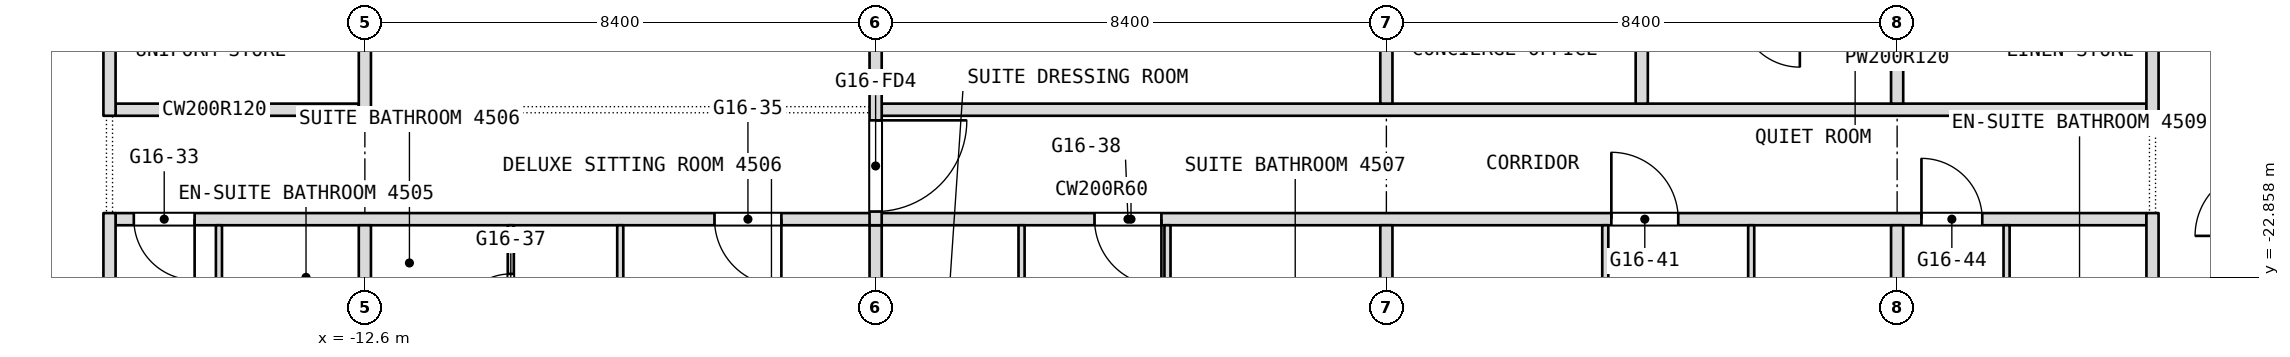
"""IFC4 building model, lengths in metres.
Left out: names, types, materials, properties, quantities, classifications, styles, units other than length and angle.
Written with IfcOpenShell. Run it as: python <this file> out.ifc"""

import sys

from ifc_helpers import new_model, si_unit, direction, frame, frame_2d, origin, place, context, subcontext, project, spatial, rectangle, extrude, element, fill, save


model = new_model("IFC4")
c1 = context("Model", 3, precision=1e-05, world=origin(), true_north=direction((0.0, 1.0)))
c2 = subcontext(c1, "Body", "Model", "MODEL_VIEW")
j1 = project(units=[si_unit("LENGTHUNIT", "METRE"), si_unit("PLANEANGLEUNIT", "RADIAN")], contexts=[c1])
p1 = place(None, origin())
s1 = spatial("IfcSite", under=j1, at=p1, CompositionType="ELEMENT")
p2 = place(p1, origin())
s2 = spatial("IfcBuilding", under=s1, at=p2, CompositionType="ELEMENT")
p3 = place(p2, frame((0.0, 0.0, 198.5)))
s3 = spatial("IfcBuildingStorey", under=s2, at=p3, CompositionType="ELEMENT", Elevation=198.5)
p4 = place(p3, frame((-16.7, -21.9, 0.0), z_axis=(0.0, 0.0, 1.0), x_axis=(1.0, 0.0, 0.0)))
e1 = element("IfcWall", 1, at=p4, inside=s3, PredefinedType="PARTITIONING", context=c2, shape_type="SweptSolid", body=[
    extrude(rectangle(XDim=33.4, YDim=0.2, at=frame_2d((16.7, 0.0))), origin(), (0.0, 0.0, 1.0), 3.34),
])
p5 = place(p4, frame((0.3, 0.0, 0.0)))
e2 = element("IfcOpeningElement", 2, at=p5, cuts=e1, PredefinedType="OPENING", context=c2, shape_type="SweptSolid", body=[
    extrude(rectangle(XDim=1.0, YDim=2.1, at=frame_2d((0.5, 1.05))), frame((0.0, 0.1, 0.0), z_axis=(0.0, -1.0, 0.0), x_axis=(1.0, 0.0, 0.0)), (0.0, 0.0, 1.0), 0.2),
])
p6 = place(p4, frame((9.85, 0.0, 0.0)))
e3 = element("IfcOpeningElement", 3, at=p6, cuts=e1, PredefinedType="OPENING", context=c2, shape_type="SweptSolid", body=[
    extrude(rectangle(XDim=1.1, YDim=2.1, at=frame_2d((0.55, 1.05))), frame((0.0, 0.1, 0.0), z_axis=(0.0, -1.0, 0.0), x_axis=(1.0, 0.0, 0.0)), (0.0, 0.0, 1.0), 0.2),
])
p7 = place(p4, frame((16.1, 0.0, 0.0)))
e4 = element("IfcOpeningElement", 4, at=p7, cuts=e1, PredefinedType="OPENING", context=c2, shape_type="SweptSolid", body=[
    extrude(rectangle(XDim=1.1, YDim=2.1, at=frame_2d((0.55, 1.05))), frame((0.0, 0.1, 0.0), z_axis=(0.0, -1.0, 0.0), x_axis=(1.0, 0.0, 0.0)), (0.0, 0.0, 1.0), 0.2),
])
p8 = place(p4, frame((24.6, 0.0, 0.0)))
e5 = element("IfcOpeningElement", 5, at=p8, cuts=e1, PredefinedType="OPENING", context=c2, shape_type="SweptSolid", body=[
    extrude(rectangle(XDim=1.1, YDim=2.1, at=frame_2d((0.55, 1.05))), frame((0.0, 0.1, 0.0), z_axis=(0.0, -1.0, 0.0), x_axis=(1.0, 0.0, 0.0)), (0.0, 0.0, 1.0), 0.2),
])
p9 = place(p4, frame((29.7, 0.0, 0.0)))
e6 = element("IfcOpeningElement", 6, at=p9, cuts=e1, PredefinedType="OPENING", context=c2, shape_type="SweptSolid", body=[
    extrude(rectangle(XDim=1.0, YDim=2.1, at=frame_2d((0.5, 1.05))), frame((0.0, 0.1, 0.0), z_axis=(0.0, -1.0, 0.0), x_axis=(1.0, 0.0, 0.0)), (0.0, 0.0, 1.0), 0.2),
])
p10 = place(p3, frame((-16.7, -20.1, 0.0), z_axis=(0.0, 0.0, 1.0), x_axis=(1.0, 0.0, 0.0)))
e7 = element("IfcWall", 7, at=p10, inside=s3, PredefinedType="PARTITIONING", context=c2, shape_type="SweptSolid", body=[
    extrude(rectangle(XDim=4.0, YDim=0.2, at=frame_2d((2.0, 0.0))), origin(), (0.0, 0.0, 1.0), 3.34),
])
p11 = place(p3, frame((-4.1, -20.1, 0.0), z_axis=(0.0, 0.0, 1.0), x_axis=(1.0, 0.0, 0.0)))
e8 = element("IfcWall", 8, at=p11, inside=s3, PredefinedType="PARTITIONING", context=c2, shape_type="SweptSolid", body=[
    extrude(rectangle(XDim=20.8, YDim=0.2, at=frame_2d((10.4, 0.0))), origin(), (0.0, 0.0, 1.0), 3.34),
])
p12 = place(p3, frame((16.8, -27.229, 0.0), z_axis=(0.0, 0.0, 1.0), x_axis=(0.0, 1.0, 0.0)))
e9 = element("IfcWall", 9, at=p12, inside=s3, PredefinedType="PARTITIONING", context=c2, shape_type="SweptSolid", body=[
    extrude(rectangle(XDim=5.429, YDim=0.2, at=frame_2d((2.714, 0.0))), origin(), (0.0, 0.0, 1.0), 3.34),
])
p13 = place(p3, frame((16.8, -20.2, 0.0), z_axis=(0.0, 0.0, 1.0), x_axis=(0.0, 1.0, 0.0)))
e10 = element("IfcWall", 10, at=p13, inside=s3, PredefinedType="PARTITIONING", context=c2, shape_type="SweptSolid", body=[
    extrude(rectangle(XDim=6.8, YDim=0.2, at=frame_2d((3.4, 0.0))), origin(), (0.0, 0.0, 1.0), 3.34),
])
p14 = place(p3, frame((14.4, -25.85, 0.0), z_axis=(0.0, 0.0, 1.0), x_axis=(0.0, 1.0, 0.0)))
e11 = element("IfcWall", 11, at=p14, inside=s3, PredefinedType="PARTITIONING", context=c2, shape_type="SweptSolid", body=[
    extrude(rectangle(XDim=3.85, YDim=0.1, at=frame_2d((1.925, 0.0))), origin(), (0.0, 0.0, 1.0), 3.34),
])
p15 = place(p3, frame((12.6, -28.343, 0.0), z_axis=(0.0, 0.0, 1.0), x_axis=(0.0, 1.0, 0.0)))
e12 = element("IfcWall", 12, at=p15, inside=s3, PredefinedType="PARTITIONING", context=c2, shape_type="SweptSolid", body=[
    extrude(rectangle(XDim=6.343, YDim=0.2, at=frame_2d((3.171, 0.0))), origin(), (0.0, 0.0, 1.0), 3.34),
])
p16 = place(p3, frame((12.6, -20.0, 0.0), z_axis=(0.0, 0.0, 1.0), x_axis=(0.0, 1.0, 0.0)))
e13 = element("IfcWall", 13, at=p16, inside=s3, PredefinedType="PARTITIONING", context=c2, shape_type="SweptSolid", body=[
    extrude(rectangle(XDim=1.5, YDim=0.2, at=frame_2d((0.75, 0.0))), origin(), (0.0, 0.0, 1.0), 3.34),
])
p17 = place(p3, frame((10.2, -25.55, 0.0), z_axis=(0.0, 0.0, 1.0), x_axis=(0.0, 1.0, 0.0)))
e14 = element("IfcWall", 14, at=p17, inside=s3, PredefinedType="PARTITIONING", context=c2, shape_type="SweptSolid", body=[
    extrude(rectangle(XDim=3.55, YDim=0.1, at=frame_2d((1.775, 0.0))), origin(), (0.0, 0.0, 1.0), 3.34),
])
p18 = place(p3, frame((8.4, -20.0, 0.0), z_axis=(0.0, 0.0, 1.0), x_axis=(0.0, 1.0, 0.0)))
e15 = element("IfcWall", 15, at=p18, inside=s3, PredefinedType="PARTITIONING", context=c2, shape_type="SweptSolid", body=[
    extrude(rectangle(XDim=1.5, YDim=0.2, at=frame_2d((0.75, 0.0))), origin(), (0.0, 0.0, 1.0), 3.34),
])
p19 = place(p3, frame((7.8, -25.45, 0.0), z_axis=(0.0, 0.0, 1.0), x_axis=(0.0, 1.0, 0.0)))
e16 = element("IfcWall", 16, at=p19, inside=s3, PredefinedType="PARTITIONING", context=c2, shape_type="SweptSolid", body=[
    extrude(rectangle(XDim=3.45, YDim=0.1, at=frame_2d((1.725, 0.0))), origin(), (0.0, 0.0, 1.0), 3.34),
])
p20 = place(p3, frame((4.2, -28.9, 0.0), z_axis=(0.0, 0.0, 1.0), x_axis=(0.0, 1.0, 0.0)))
e17 = element("IfcWall", 17, at=p20, inside=s3, PredefinedType="PARTITIONING", context=c2, shape_type="SweptSolid", body=[
    extrude(rectangle(XDim=6.9, YDim=0.2, at=frame_2d((3.45, 0.0))), origin(), (0.0, 0.0, 1.0), 3.34),
])
p21 = place(p3, frame((4.2, -20.0, 0.0), z_axis=(0.0, 0.0, 1.0), x_axis=(0.0, 1.0, 0.0)))
e18 = element("IfcWall", 18, at=p21, inside=s3, PredefinedType="PARTITIONING", context=c2, shape_type="SweptSolid", body=[
    extrude(rectangle(XDim=6.4, YDim=0.2, at=frame_2d((3.2, 0.0))), origin(), (0.0, 0.0, 1.0), 3.34),
])
p22 = place(p3, frame((0.6, -25.55, 0.0), z_axis=(0.0, 0.0, 1.0), x_axis=(0.0, 1.0, 0.0)))
e19 = element("IfcWall", 19, at=p22, inside=s3, PredefinedType="PARTITIONING", context=c2, shape_type="SweptSolid", body=[
    extrude(rectangle(XDim=3.55, YDim=0.1, at=frame_2d((1.775, 0.0))), origin(), (0.0, 0.0, 1.0), 3.34),
])
p23 = place(p3, frame((-1.8, -25.45, 0.0), z_axis=(0.0, 0.0, 1.0), x_axis=(0.0, 1.0, 0.0)))
e20 = element("IfcWall", 20, at=p23, inside=s3, PredefinedType="PARTITIONING", context=c2, shape_type="SweptSolid", body=[
    extrude(rectangle(XDim=3.45, YDim=0.1, at=frame_2d((1.725, 0.0))), origin(), (0.0, 0.0, 1.0), 3.34),
])
p24 = place(p3, frame((-4.2, -28.9, 0.0), z_axis=(0.0, 0.0, 1.0), x_axis=(0.0, 1.0, 0.0)))
e21 = element("IfcWall", 21, at=p24, inside=s3, PredefinedType="PARTITIONING", context=c2, shape_type="SweptSolid", body=[
    extrude(rectangle(XDim=6.9, YDim=0.2, at=frame_2d((3.45, 0.0))), origin(), (0.0, 0.0, 1.0), 3.34),
])
p25 = place(p3, frame((-4.2, -22.0, 0.0), z_axis=(0.0, 0.0, 1.0), x_axis=(0.0, 1.0, 0.0)))
e22 = element("IfcWall", 22, at=p25, inside=s3, PredefinedType="PARTITIONING", context=c2, shape_type="SweptSolid", body=[
    extrude(rectangle(XDim=8.4, YDim=0.2, at=frame_2d((4.2, 0.0))), origin(), (0.0, 0.0, 1.0), 3.34),
])
p26 = place(p25, frame((0.225, 0.0, 0.0)))
e23 = element("IfcOpeningElement", 23, at=p26, cuts=e22, PredefinedType="OPENING", context=c2, shape_type="SweptSolid", body=[
    extrude(rectangle(XDim=1.5, YDim=2.1, at=frame_2d((0.75, 1.05))), frame((0.0, 0.1, 0.0), z_axis=(0.0, -1.0, 0.0), x_axis=(1.0, 0.0, 0.0)), (0.0, 0.0, 1.0), 0.2),
])
p27 = place(p3, frame((-8.4, -28.9, 0.0), z_axis=(0.0, 0.0, 1.0), x_axis=(0.0, 1.0, 0.0)))
e24 = element("IfcWall", 24, at=p27, inside=s3, PredefinedType="PARTITIONING", context=c2, shape_type="SweptSolid", body=[
    extrude(rectangle(XDim=6.9, YDim=0.1, at=frame_2d((3.45, 0.0))), origin(), (0.0, 0.0, 1.0), 3.34),
])
p28 = place(p27, frame((2.53, 0.0, 0.0)))
e25 = element("IfcOpeningElement", 25, at=p28, cuts=e24, PredefinedType="OPENING", context=c2, shape_type="SweptSolid", body=[
    extrude(rectangle(XDim=0.9, YDim=2.1, at=frame_2d((0.45, 1.05))), frame((0.0, 0.05, 0.0), z_axis=(0.0, -1.0, 0.0), x_axis=(1.0, 0.0, 0.0)), (0.0, 0.0, 1.0), 0.1),
])
p29 = place(p3, frame((-10.2, -24.55, 0.0), z_axis=(0.0, 0.0, 1.0), x_axis=(0.0, 1.0, 0.0)))
e26 = element("IfcWall", 26, at=p29, inside=s3, PredefinedType="PARTITIONING", context=c2, shape_type="SweptSolid", body=[
    extrude(rectangle(XDim=2.55, YDim=0.1, at=frame_2d((1.275, 0.0))), origin(), (0.0, 0.0, 1.0), 3.34),
])
p30 = place(p29, frame((0.85, 0.0, 0.0)))
e27 = element("IfcOpeningElement", 27, at=p30, cuts=e26, PredefinedType="OPENING", context=c2, shape_type="SweptSolid", body=[
    extrude(rectangle(XDim=0.9, YDim=2.1, at=frame_2d((0.45, 1.05))), frame((0.0, 0.05, 0.0), z_axis=(0.0, -1.0, 0.0), x_axis=(1.0, 0.0, 0.0)), (0.0, 0.0, 1.0), 0.1),
])
p31 = place(p3, frame((-12.6, -28.343, 0.0), z_axis=(0.0, 0.0, 1.0), x_axis=(0.0, 1.0, 0.0)))
e28 = element("IfcWall", 28, at=p31, inside=s3, PredefinedType="PARTITIONING", context=c2, shape_type="SweptSolid", body=[
    extrude(rectangle(XDim=6.343, YDim=0.2, at=frame_2d((3.171, 0.0))), origin(), (0.0, 0.0, 1.0), 3.34),
])
p32 = place(p3, frame((-12.6, -20.2, 0.0), z_axis=(0.0, 0.0, 1.0), x_axis=(0.0, 1.0, 0.0)))
e29 = element("IfcWall", 29, at=p32, inside=s3, PredefinedType="PARTITIONING", context=c2, shape_type="SweptSolid", body=[
    extrude(rectangle(XDim=6.8, YDim=0.2, at=frame_2d((3.4, 0.0))), origin(), (0.0, 0.0, 1.0), 3.34),
])
p33 = place(p3, frame((-15.0, -24.75, 0.0), z_axis=(0.0, 0.0, 1.0), x_axis=(0.0, 1.0, 0.0)))
e30 = element("IfcWall", 30, at=p33, inside=s3, PredefinedType="PARTITIONING", context=c2, shape_type="SweptSolid", body=[
    extrude(rectangle(XDim=2.75, YDim=0.1, at=frame_2d((1.375, 0.0))), origin(), (0.0, 0.0, 1.0), 3.34),
])
p34 = place(p3, frame((-16.8, -27.229, 0.0), z_axis=(0.0, 0.0, 1.0), x_axis=(0.0, 1.0, 0.0)))
e31 = element("IfcWall", 31, at=p34, inside=s3, PredefinedType="PARTITIONING", context=c2, shape_type="SweptSolid", body=[
    extrude(rectangle(XDim=5.429, YDim=0.2, at=frame_2d((2.714, 0.0))), origin(), (0.0, 0.0, 1.0), 3.34),
])
p35 = place(p3, frame((-16.8, -20.2, 0.0), z_axis=(0.0, 0.0, 1.0), x_axis=(0.0, 1.0, 0.0)))
e32 = element("IfcWall", 32, at=p35, inside=s3, PredefinedType="PARTITIONING", context=c2, shape_type="SweptSolid", body=[
    extrude(rectangle(XDim=6.8, YDim=0.2, at=frame_2d((3.4, 0.0))), origin(), (0.0, 0.0, 1.0), 3.34),
])
p36 = place(p5, origin())
e33 = element("IfcDoor", 33, at=p36, inside=s3, OperationType="SINGLE_SWING_RIGHT", PredefinedType="DOOR", context=c2, shape_type="SweptSolid", body=[
    extrude(rectangle(XDim=1.0, YDim=2.1, at=frame_2d((0.5, 1.05))), frame((0.0, 0.025, 0.0), z_axis=(0.0, -1.0, 0.0), x_axis=(1.0, 0.0, 0.0)), (0.0, 0.0, 1.0), 0.05),
])
fill(e2, e33)
p37 = place(p6, origin())
e34 = element("IfcDoor", 34, at=p37, inside=s3, OperationType="SINGLE_SWING_LEFT", PredefinedType="DOOR", context=c2, shape_type="SweptSolid", body=[
    extrude(rectangle(XDim=1.1, YDim=2.1, at=frame_2d((0.55, 1.05))), frame((0.0, 0.025, 0.0), z_axis=(0.0, -1.0, 0.0), x_axis=(1.0, 0.0, 0.0)), (0.0, 0.0, 1.0), 0.05),
])
fill(e3, e34)
p38 = place(p7, origin())
e35 = element("IfcDoor", 35, at=p38, inside=s3, OperationType="SINGLE_SWING_LEFT", PredefinedType="DOOR", context=c2, shape_type="SweptSolid", body=[
    extrude(rectangle(XDim=1.1, YDim=2.1, at=frame_2d((0.55, 1.05))), frame((0.0, 0.025, 0.0), z_axis=(0.0, -1.0, 0.0), x_axis=(1.0, 0.0, 0.0)), (0.0, 0.0, 1.0), 0.05),
])
fill(e4, e35)
p39 = place(p8, origin())
e36 = element("IfcDoor", 36, at=p39, inside=s3, OperationType="SINGLE_SWING_RIGHT", PredefinedType="DOOR", context=c2, shape_type="SweptSolid", body=[
    extrude(rectangle(XDim=1.1, YDim=2.1, at=frame_2d((0.55, 1.05))), frame((0.0, 0.025, 0.0), z_axis=(0.0, -1.0, 0.0), x_axis=(1.0, 0.0, 0.0)), (0.0, 0.0, 1.0), 0.05),
])
fill(e5, e36)
p40 = place(p9, origin())
e37 = element("IfcDoor", 37, at=p40, inside=s3, OperationType="SINGLE_SWING_RIGHT", PredefinedType="DOOR", context=c2, shape_type="SweptSolid", body=[
    extrude(rectangle(XDim=1.0, YDim=2.1, at=frame_2d((0.5, 1.05))), frame((0.0, 0.025, 0.0), z_axis=(0.0, -1.0, 0.0), x_axis=(1.0, 0.0, 0.0)), (0.0, 0.0, 1.0), 0.05),
])
fill(e6, e37)
p41 = place(p30, origin())
e38 = element("IfcDoor", 38, at=p41, inside=s3, OperationType="SINGLE_SWING_RIGHT", PredefinedType="DOOR", context=c2, shape_type="SweptSolid", body=[
    extrude(rectangle(XDim=0.9, YDim=2.1, at=frame_2d((0.45, 1.05))), frame((0.0, 0.025, 0.0), z_axis=(0.0, -1.0, 0.0), x_axis=(1.0, 0.0, 0.0)), (0.0, 0.0, 1.0), 0.05),
])
fill(e27, e38)
p42 = place(p26, origin())
e39 = element("IfcDoor", 39, at=p42, inside=s3, OperationType="DOUBLE_DOOR_DOUBLE_SWING", PredefinedType="DOOR", context=c2, shape_type="SweptSolid", body=[
    extrude(rectangle(XDim=1.5, YDim=2.1, at=frame_2d((0.75, 1.05))), frame((0.0, 0.025, 0.0), z_axis=(0.0, -1.0, 0.0), x_axis=(1.0, 0.0, 0.0)), (0.0, 0.0, 1.0), 0.05),
])
fill(e23, e39)
save(model, sys.argv[1])
